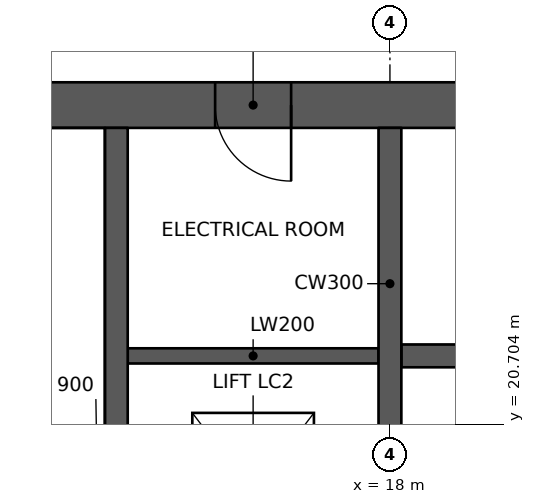
"""IFC4 building model, lengths in metres.
Left out: names, types, materials, properties, quantities, classifications, styles, units other than length and angle.
Written with IfcOpenShell. Run it as: python <this file> out.ifc"""

import sys

from ifc_helpers import new_model, si_unit, direction, frame, frame_2d, origin, place, context, subcontext, project, spatial, rectangle, extrude, element, fill, save


model = new_model("IFC4")
c1 = context("Model", 3, precision=1e-05, world=origin(), true_north=direction((0.0, 1.0)))
c2 = subcontext(c1, "Body", "Model", "MODEL_VIEW")
j1 = project(units=[si_unit("LENGTHUNIT", "METRE"), si_unit("PLANEANGLEUNIT", "RADIAN")], contexts=[c1])
p1 = place(None, origin())
s1 = spatial("IfcSite", under=j1, at=p1, CompositionType="ELEMENT")
p2 = place(p1, origin())
s2 = spatial("IfcBuilding", under=s1, at=p2, CompositionType="ELEMENT")
p3 = place(p2, frame((0.0, 0.0, 255.4)))
s3 = spatial("IfcBuildingStorey", under=s2, at=p3, CompositionType="ELEMENT", Elevation=255.4)
p4 = place(p3, frame((10.8, 24.9, 0.0), z_axis=(0.0, 0.0, 1.0), x_axis=(1.0, 0.0, 0.0)))
e1 = element("IfcWall", 1, at=p4, inside=s3, PredefinedType="SHEAR", context=c2, shape_type="SweptSolid", body=[
    extrude(rectangle(XDim=23.4, YDim=0.6, at=frame_2d((11.7, 0.0))), origin(), (0.0, 0.0, 1.0), 3.6),
])
p5 = place(p4, frame((17.2, 0.0, 0.0)))
e2 = element("IfcOpeningElement", 2, at=p5, cuts=e1, PredefinedType="OPENING", context=c2, shape_type="SweptSolid", body=[
    extrude(rectangle(XDim=1.8, YDim=2.1, at=frame_2d((0.9, 1.05))), frame((0.0, 0.31, 0.0), z_axis=(0.0, -1.0, 0.0), x_axis=(1.0, 0.0, 0.0)), (0.0, 0.0, 1.0), 0.62),
])
p6 = place(p4, frame((21.1, 0.0, 0.0)))
e3 = element("IfcOpeningElement", 3, at=p6, cuts=e1, PredefinedType="OPENING", context=c2, shape_type="SweptSolid", body=[
    extrude(rectangle(XDim=1.0, YDim=2.1, at=frame_2d((0.5, 1.05))), frame((0.0, 0.31, 0.0), z_axis=(0.0, -1.0, 0.0), x_axis=(1.0, 0.0, 0.0)), (0.0, 0.0, 1.0), 0.62),
])
p7 = place(p4, frame((4.9, 0.0, 0.0)))
e4 = element("IfcOpeningElement", 4, at=p7, cuts=e1, PredefinedType="OPENING", context=c2, shape_type="SweptSolid", body=[
    extrude(rectangle(XDim=1.0, YDim=2.1, at=frame_2d((0.5, 1.05))), frame((0.0, 0.31, 0.0), z_axis=(0.0, -1.0, 0.0), x_axis=(1.0, 0.0, 0.0)), (0.0, 0.0, 1.0), 0.62),
])
p8 = place(p3, frame((14.4, 11.4, 0.0), z_axis=(0.0, 0.0, 1.0), x_axis=(0.0, 1.0, 0.0)))
e5 = element("IfcWall", 5, at=p8, inside=s3, PredefinedType="SHEAR", context=c2, shape_type="SweptSolid", body=[
    extrude(rectangle(XDim=13.2, YDim=0.3, at=frame_2d((6.6, 0.0))), origin(), (0.0, 0.0, 1.0), 3.6),
])
p9 = place(p3, frame((18.0, 11.4, 0.0), z_axis=(0.0, 0.0, 1.0), x_axis=(0.0, 1.0, 0.0)))
e6 = element("IfcWall", 6, at=p9, inside=s3, PredefinedType="SHEAR", context=c2, shape_type="SweptSolid", body=[
    extrude(rectangle(XDim=13.2, YDim=0.3, at=frame_2d((6.6, 0.0))), origin(), (0.0, 0.0, 1.0), 3.6),
])
p10 = place(p9, frame((3.6, 0.0, 0.0)))
e7 = element("IfcOpeningElement", 7, at=p10, cuts=e6, PredefinedType="OPENING", context=c2, shape_type="SweptSolid", body=[
    extrude(rectangle(XDim=1.0, YDim=2.1, at=frame_2d((0.5, 1.05))), frame((0.0, 0.16, 0.0), z_axis=(0.0, -1.0, 0.0), x_axis=(1.0, 0.0, 0.0)), (0.0, 0.0, 1.0), 0.32),
])
p11 = place(p9, frame((7.85, 0.0, 0.0)))
e8 = element("IfcOpeningElement", 8, at=p11, cuts=e6, PredefinedType="OPENING", context=c2, shape_type="SweptSolid", body=[
    extrude(rectangle(XDim=1.1, YDim=2.1, at=frame_2d((0.55, 1.05))), frame((0.0, 0.16, 0.0), z_axis=(0.0, -1.0, 0.0), x_axis=(1.0, 0.0, 0.0)), (0.0, 0.0, 1.0), 0.32),
])
p12 = place(p3, frame((18.15, 21.6, 0.0), z_axis=(0.0, 0.0, 1.0), x_axis=(1.0, 0.0, 0.0)))
e9 = element("IfcWall", 9, at=p12, inside=s3, PredefinedType="SHEAR", context=c2, shape_type="SweptSolid", body=[
    extrude(rectangle(XDim=9.0, YDim=0.3, at=frame_2d((4.5, 0.0))), origin(), (0.0, 0.0, 1.0), 3.6),
])
p13 = place(p12, frame((6.75, 0.0, 0.0)))
e10 = element("IfcOpeningElement", 10, at=p13, cuts=e9, PredefinedType="OPENING", context=c2, shape_type="SweptSolid", body=[
    extrude(rectangle(XDim=1.2, YDim=2.1, at=frame_2d((0.6, 1.05))), frame((0.0, 0.16, 0.0), z_axis=(0.0, -1.0, 0.0), x_axis=(1.0, 0.0, 0.0)), (0.0, 0.0, 1.0), 0.32),
])
p14 = place(p12, frame((0.8, 0.0, 0.0)))
e11 = element("IfcOpeningElement", 11, at=p14, cuts=e9, PredefinedType="OPENING", context=c2, shape_type="SweptSolid", body=[
    extrude(rectangle(XDim=1.1, YDim=2.1, at=frame_2d((0.55, 1.05))), frame((0.0, 0.16, 0.0), z_axis=(0.0, -1.0, 0.0), x_axis=(1.0, 0.0, 0.0)), (0.0, 0.0, 1.0), 0.32),
])
p15 = place(p12, frame((3.8, 0.0, 0.0)))
e12 = element("IfcOpeningElement", 12, at=p15, cuts=e9, PredefinedType="OPENING", context=c2, shape_type="SweptSolid", body=[
    extrude(rectangle(XDim=1.1, YDim=2.1, at=frame_2d((0.55, 1.05))), frame((0.0, 0.16, 0.0), z_axis=(0.0, -1.0, 0.0), x_axis=(1.0, 0.0, 0.0)), (0.0, 0.0, 1.0), 0.32),
])
p16 = place(p3, frame((14.55, 21.6, 0.0), z_axis=(0.0, 0.0, 1.0), x_axis=(1.0, 0.0, 0.0)))
e13 = element("IfcWall", 13, at=p16, inside=s3, PredefinedType="SHEAR", context=c2, shape_type="SweptSolid", body=[
    extrude(rectangle(XDim=3.3, YDim=0.2, at=frame_2d((1.65, 0.0))), origin(), (0.0, 0.0, 1.0), 3.6),
])
p17 = place(p7, frame((1.0, 0.0, 0.0), z_axis=(0.0, 0.0, 1.0), x_axis=(-1.0, 0.0, 0.0)))
e14 = element("IfcDoor", 14, at=p17, inside=s3, OperationType="SINGLE_SWING_LEFT", PredefinedType="DOOR", context=c2, shape_type="SweptSolid", body=[
    extrude(rectangle(XDim=1.0, YDim=2.1, at=frame_2d((0.5, 1.05))), frame((0.0, 0.025, 0.0), z_axis=(0.0, -1.0, 0.0), x_axis=(1.0, 0.0, 0.0)), (0.0, 0.0, 1.0), 0.05),
])
fill(e4, e14)
save(model, sys.argv[1])
